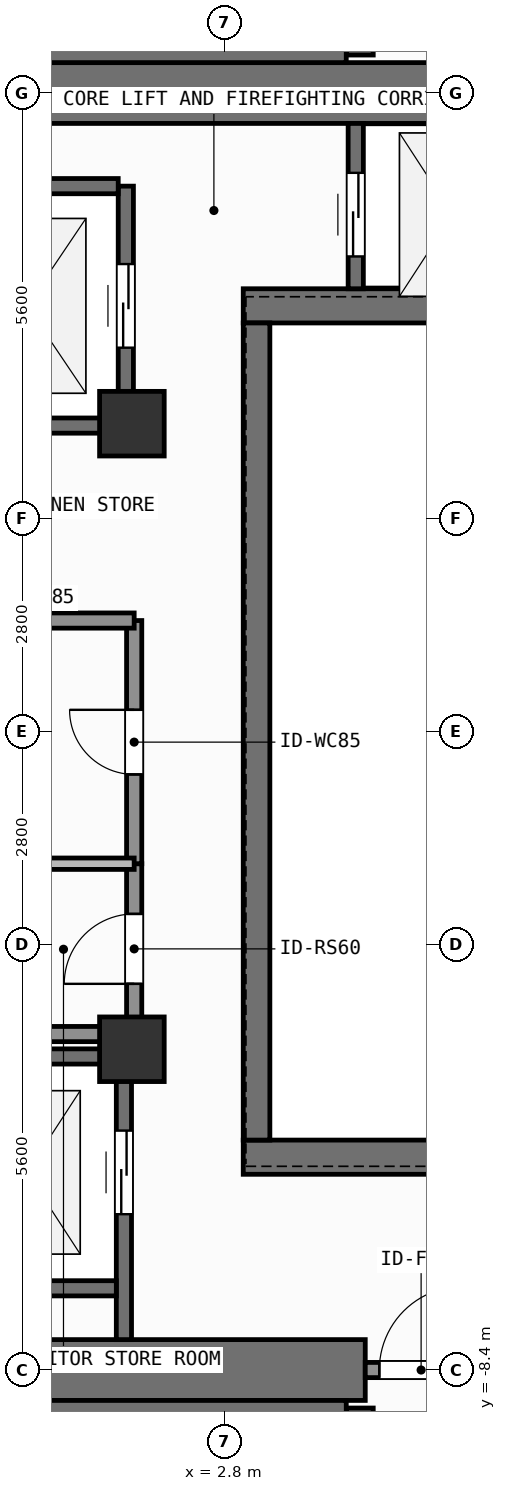
"""IFC4 building model, lengths in metres.
Left out: names, types, materials, properties, quantities, classifications, styles, units other than length and angle.
Written with IfcOpenShell. Run it as: python <this file> out.ifc"""

import sys

from ifc_helpers import new_model, si_unit, direction, frame, frame_2d, origin, origin_2d, place, context, subcontext, project, spatial, rectangle, extrude, element, fill, save


model = new_model("IFC4")
c1 = context("Model", 3, precision=1e-05, world=origin(), true_north=direction((0.0, 1.0)))
c2 = subcontext(c1, "Body", "Model", "MODEL_VIEW")
j1 = project(units=[si_unit("LENGTHUNIT", "METRE"), si_unit("PLANEANGLEUNIT", "RADIAN")], contexts=[c1])
p1 = place(None, origin())
s1 = spatial("IfcSite", under=j1, at=p1, CompositionType="ELEMENT")
p2 = place(p1, origin())
s2 = spatial("IfcBuilding", under=s1, at=p2, CompositionType="ELEMENT")
p3 = place(p2, frame((0.0, 0.0, 203.1)))
s3 = spatial("IfcBuildingStorey", under=s2, at=p3, CompositionType="ELEMENT", Elevation=203.1)
p4 = place(p3, frame((-2.62, -8.4, 0.0), z_axis=(0.0, 0.0, 1.0), x_axis=(1.0, 0.0, 0.0)))
e1 = element("IfcWall", 1, at=p4, inside=s3, PredefinedType="SHEAR", context=c2, shape_type="SweptSolid", body=[
    extrude(rectangle(XDim=7.27, YDim=0.8, at=frame_2d((3.635, 0.0))), origin(), (0.0, 0.0, 1.0), 3.9),
])
p5 = place(p3, frame((-7.55, 8.4, 0.0), z_axis=(0.0, 0.0, 1.0), x_axis=(1.0, 0.0, 0.0)))
e2 = element("IfcWall", 2, at=p5, inside=s3, PredefinedType="SHEAR", context=c2, shape_type="SweptSolid", body=[
    extrude(rectangle(XDim=16.35, YDim=0.8, at=frame_2d((8.175, 0.0))), origin(), (0.0, 0.0, 1.0), 3.9),
])
for number, where, z_axis, x_axis in (
    (3, (3.045, -5.6, 0.0), (0.0, 0.0, 1.0), (1.0, 0.0, 0.0)),
    (4, (3.045, 5.6, 0.0), (0.0, 0.0, 1.0), (1.0, 0.0, 0.0)),
):
    element("IfcWall", number, at=place(p3, frame(where, z_axis=z_axis, x_axis=x_axis)), inside=s3, PredefinedType="SHEAR", context=c2, shape_type="SweptSolid", body=[
        extrude(rectangle(XDim=5.755, YDim=0.45, at=frame_2d((2.877, 0.0))), origin(), (0.0, 0.0, 1.0), 3.9),
    ])
p6 = place(p3, frame((3.22, -5.375, 0.0), z_axis=(0.0, 0.0, 1.0), x_axis=(0.0, 1.0, 0.0)))
e5 = element("IfcWall", 5, at=p6, inside=s3, PredefinedType="SHEAR", context=c2, shape_type="SweptSolid", body=[
    extrude(rectangle(XDim=10.75, YDim=0.35, at=frame_2d((5.375, 0.0))), origin(), (0.0, 0.0, 1.0), 3.9),
])
p7 = place(p3, frame((-2.2, -8.913, 0.0), z_axis=(0.0, 0.0, 1.0), x_axis=(1.0, 0.0, 0.0)))
e6 = element("IfcWall", 6, at=p7, inside=s3, PredefinedType="SHEAR", context=c2, shape_type="SweptSolid", body=[
    extrude(rectangle(XDim=6.6, YDim=0.225, at=frame_2d((3.3, 0.0))), origin(), (0.0, 0.0, 1.0), 3.9),
])
p8 = place(p3, frame((4.58, -8.9, 0.0), z_axis=(0.0, 0.0, 1.0), x_axis=(0.0, -1.0, 0.0)))
e7 = element("IfcWall", 7, at=p8, inside=s3, PredefinedType="SHEAR", context=c2, shape_type="SweptSolid", body=[
    extrude(rectangle(XDim=2.925, YDim=0.35, at=frame_2d((1.462, 0.0))), origin(), (0.0, 0.0, 1.0), 3.9),
])
p9 = place(p8, frame((0.913, 0.0, 0.0)))
e8 = element("IfcOpeningElement", 8, at=p9, cuts=e7, PredefinedType="OPENING", context=c2, shape_type="SweptSolid", body=[
    extrude(rectangle(XDim=1.1, YDim=2.15, at=frame_2d((0.55, 1.075))), frame((0.0, 0.185, 0.0), z_axis=(0.0, -1.0, 0.0), x_axis=(1.0, 0.0, 0.0)), (0.0, 0.0, 1.0), 0.37),
])
p10 = place(p3, frame((-2.2, 8.913, 0.0), z_axis=(0.0, 0.0, 1.0), x_axis=(1.0, 0.0, 0.0)))
e9 = element("IfcWall", 9, at=p10, inside=s3, PredefinedType="SHEAR", context=c2, shape_type="SweptSolid", body=[
    extrude(rectangle(XDim=6.6, YDim=0.225, at=frame_2d((3.3, 0.0))), origin(), (0.0, 0.0, 1.0), 3.9),
])
p11 = place(p3, frame((4.58, 11.825, 0.0), z_axis=(0.0, 0.0, 1.0), x_axis=(0.0, -1.0, 0.0)))
e10 = element("IfcWall", 10, at=p11, inside=s3, PredefinedType="SHEAR", context=c2, shape_type="SweptSolid", body=[
    extrude(rectangle(XDim=2.925, YDim=0.35, at=frame_2d((1.462, 0.0))), origin(), (0.0, 0.0, 1.0), 3.9),
])
p12 = place(p11, frame((0.913, 0.0, 0.0)))
e11 = element("IfcOpeningElement", 11, at=p12, cuts=e10, PredefinedType="OPENING", context=c2, shape_type="SweptSolid", body=[
    extrude(rectangle(XDim=1.1, YDim=2.15, at=frame_2d((0.55, 1.075))), frame((0.0, 0.185, 0.0), z_axis=(0.0, -1.0, 0.0), x_axis=(1.0, 0.0, 0.0)), (0.0, 0.0, 1.0), 0.37),
])
for number, where, z_axis, x_axis in (
    (12, (1.58, -4.18, 0.0), (0.0, 0.0, 1.0), (1.0, 0.0, 0.0)),
    (13, (1.58, 4.05, 0.0), (0.0, 0.0, 1.0), (1.0, 0.0, 0.0)),
):
    element("IfcColumn", number, at=place(p3, frame(where, z_axis=z_axis, x_axis=x_axis)), inside=s3, PredefinedType="COLUMN", context=c2, shape_type="SweptSolid", body=[
        extrude(rectangle(XDim=0.85, YDim=0.85, at=origin_2d()), origin(), (0.0, 0.0, 1.0), 3.9),
    ])
p13 = place(p3, frame((1.5, 4.025, 0.0), z_axis=(0.0, 0.0, 1.0), x_axis=(0.0, 1.0, 0.0)))
e14 = element("IfcWall", 14, at=p13, inside=s3, PredefinedType="SHEAR", context=c2, shape_type="SweptSolid", body=[
    extrude(rectangle(XDim=3.15, YDim=0.2, at=frame_2d((1.575, 0.0))), origin(), (0.0, 0.0, 1.0), 3.68),
])
p14 = place(p13, frame((1.025, 0.0, 0.0)))
e15 = element("IfcOpeningElement", 15, at=p14, cuts=e14, PredefinedType="OPENING", context=c2, shape_type="SweptSolid", body=[
    extrude(rectangle(XDim=1.1, YDim=2.2, at=frame_2d((0.55, 1.1))), frame((0.0, 0.11, 0.0), z_axis=(0.0, -1.0, 0.0), x_axis=(1.0, 0.0, 0.0)), (0.0, 0.0, 1.0), 0.22),
])
for number, where, z_axis, x_axis in (
    (16, (-1.0, 4.025, 0.0), (0.0, 0.0, 1.0), (1.0, 0.0, 0.0)),
    (17, (-1.0, 7.175, 0.0), (0.0, 0.0, 1.0), (1.0, 0.0, 0.0)),
):
    element("IfcWall", number, at=place(p3, frame(where, z_axis=z_axis, x_axis=x_axis)), inside=s3, PredefinedType="SHEAR", context=c2, shape_type="SweptSolid", body=[
        extrude(rectangle(XDim=2.4, YDim=0.2, at=frame_2d((1.2, 0.0))), origin(), (0.0, 0.0, 1.0), 3.68),
    ])
p15 = place(p3, frame((1.475, -8.0, 0.0), z_axis=(0.0, 0.0, 1.0), x_axis=(0.0, 1.0, 0.0)))
e18 = element("IfcWall", 18, at=p15, inside=s3, PredefinedType="SHEAR", context=c2, shape_type="SweptSolid", body=[
    extrude(rectangle(XDim=3.725, YDim=0.2, at=frame_2d((1.863, 0.0))), origin(), (0.0, 0.0, 1.0), 3.68),
])
p16 = place(p15, frame((1.65, 0.0, 0.0)))
e19 = element("IfcOpeningElement", 19, at=p16, cuts=e18, PredefinedType="OPENING", context=c2, shape_type="SweptSolid", body=[
    extrude(rectangle(XDim=1.1, YDim=2.2, at=frame_2d((0.55, 1.1))), frame((0.0, 0.11, 0.0), z_axis=(0.0, -1.0, 0.0), x_axis=(1.0, 0.0, 0.0)), (0.0, 0.0, 1.0), 0.22),
])
for number, where, z_axis, x_axis in (
    (20, (-0.975, -7.325, 0.0), (0.0, 0.0, 1.0), (1.0, 0.0, 0.0)),
    (21, (-0.975, -4.275, 0.0), (0.0, 0.0, 1.0), (1.0, 0.0, 0.0)),
):
    element("IfcWall", number, at=place(p3, frame(where, z_axis=z_axis, x_axis=x_axis)), inside=s3, PredefinedType="SHEAR", context=c2, shape_type="SweptSolid", body=[
        extrude(rectangle(XDim=2.35, YDim=0.2, at=frame_2d((1.175, 0.0))), origin(), (0.0, 0.0, 1.0), 3.68),
    ])
p17 = place(p3, frame((4.525, 5.825, 0.0), z_axis=(0.0, 0.0, 1.0), x_axis=(0.0, 1.0, 0.0)))
e22 = element("IfcWall", 22, at=p17, inside=s3, PredefinedType="SHEAR", context=c2, shape_type="SweptSolid", body=[
    extrude(rectangle(XDim=2.175, YDim=0.2, at=frame_2d((1.087, 0.0))), origin(), (0.0, 0.0, 1.0), 3.68),
])
p18 = place(p17, frame((0.425, 0.0, 0.0)))
e23 = element("IfcOpeningElement", 23, at=p18, cuts=e22, PredefinedType="OPENING", context=c2, shape_type="SweptSolid", body=[
    extrude(rectangle(XDim=1.1, YDim=2.2, at=frame_2d((0.55, 1.1))), frame((0.0, 0.11, 0.0), z_axis=(0.0, -1.0, 0.0), x_axis=(1.0, 0.0, 0.0)), (0.0, 0.0, 1.0), 0.22),
])
p19 = place(p3, frame((4.65, -8.4, 0.0), z_axis=(0.0, 0.0, 1.0), x_axis=(1.0, 0.0, 0.0)))
e24 = element("IfcWall", 24, at=p19, inside=s3, PredefinedType="SOLIDWALL", context=c2, shape_type="SweptSolid", body=[
    extrude(rectangle(XDim=1.47, YDim=0.2, at=frame_2d((0.735, 0.0))), origin(), (0.0, 0.0, 1.0), 2.82),
])
p20 = place(p19, frame((0.185, 0.0, 0.0)))
e25 = element("IfcOpeningElement", 25, at=p20, cuts=e24, PredefinedType="OPENING", context=c2, shape_type="SweptSolid", body=[
    extrude(rectangle(XDim=1.1, YDim=2.15, at=frame_2d((0.55, 1.075))), frame((0.0, 0.11, 0.0), z_axis=(0.0, -1.0, 0.0), x_axis=(1.0, 0.0, 0.0)), (0.0, 0.0, 1.0), 0.22),
])
p21 = place(p3, frame((1.61, -3.98, 0.0), z_axis=(0.0, 0.0, 1.0), x_axis=(0.0, 1.0, 0.0)))
e26 = element("IfcWall", 26, at=p21, inside=s3, PredefinedType="SOLIDWALL", context=c2, shape_type="SweptSolid", body=[
    extrude(rectangle(XDim=2.241, YDim=0.2, at=frame_2d((1.121, 0.0))), origin(), (0.0, 0.0, 1.0), 3.68),
])
p22 = place(p21, frame((0.66, 0.0, 0.0)))
e27 = element("IfcOpeningElement", 27, at=p22, cuts=e26, PredefinedType="OPENING", context=c2, shape_type="SweptSolid", body=[
    extrude(rectangle(XDim=0.92, YDim=2.1, at=frame_2d((0.46, 1.05))), frame((0.0, 0.11, 0.0), z_axis=(0.0, -1.0, 0.0), x_axis=(1.0, 0.0, 0.0)), (0.0, 0.0, 1.0), 0.22),
])
p23 = place(p3, frame((1.61, -1.739, 0.0), z_axis=(0.0, 0.0, 1.0), x_axis=(0.0, 1.0, 0.0)))
e28 = element("IfcWall", 28, at=p23, inside=s3, PredefinedType="SOLIDWALL", context=c2, shape_type="SweptSolid", body=[
    extrude(rectangle(XDim=3.199, YDim=0.2, at=frame_2d((1.6, 0.0))), origin(), (0.0, 0.0, 1.0), 3.68),
])
p24 = place(p23, frame((1.175, 0.0, 0.0)))
e29 = element("IfcOpeningElement", 29, at=p24, cuts=e28, PredefinedType="OPENING", context=c2, shape_type="SweptSolid", body=[
    extrude(rectangle(XDim=0.85, YDim=2.1, at=frame_2d((0.425, 1.05))), frame((0.0, 0.11, 0.0), z_axis=(0.0, -1.0, 0.0), x_axis=(1.0, 0.0, 0.0)), (0.0, 0.0, 1.0), 0.22),
])
for number, where, z_axis, x_axis in (
    (30, (-1.58, -3.98, 0.0), (0.0, 0.0, 1.0), (1.0, 0.0, 0.0)),
    (31, (-1.58, 1.46, 0.0), (0.0, 0.0, 1.0), (1.0, 0.0, 0.0)),
):
    element("IfcWall", number, at=place(p3, frame(where, z_axis=z_axis, x_axis=x_axis)), inside=s3, PredefinedType="SOLIDWALL", context=c2, shape_type="SweptSolid", body=[
        extrude(rectangle(XDim=3.19, YDim=0.2, at=frame_2d((1.595, 0.0))), origin(), (0.0, 0.0, 1.0), 3.68),
    ])
p25 = place(p3, frame((-1.58, -1.739, 0.0), z_axis=(0.0, 0.0, 1.0), x_axis=(1.0, 0.0, 0.0)))
e32 = element("IfcWall", 32, at=p25, inside=s3, PredefinedType="PARTITIONING", context=c2, shape_type="SweptSolid", body=[
    extrude(rectangle(XDim=3.19, YDim=0.15, at=frame_2d((1.595, 0.0))), origin(), (0.0, 0.0, 1.0), 3.68),
])
p26 = place(p14, origin())
e33 = element("IfcDoor", 33, at=p26, inside=s3, OperationType="SLIDING_TO_LEFT", PredefinedType="DOOR", context=c2, shape_type="SweptSolid", body=[
    extrude(rectangle(XDim=1.1, YDim=2.2, at=frame_2d((0.55, 1.1))), frame((0.0, 0.025, 0.0), z_axis=(0.0, -1.0, 0.0), x_axis=(1.0, 0.0, 0.0)), (0.0, 0.0, 1.0), 0.05),
])
fill(e15, e33)
p27 = place(p16, origin())
e34 = element("IfcDoor", 34, at=p27, inside=s3, OperationType="SLIDING_TO_LEFT", PredefinedType="DOOR", context=c2, shape_type="SweptSolid", body=[
    extrude(rectangle(XDim=1.1, YDim=2.2, at=frame_2d((0.55, 1.1))), frame((0.0, 0.025, 0.0), z_axis=(0.0, -1.0, 0.0), x_axis=(1.0, 0.0, 0.0)), (0.0, 0.0, 1.0), 0.05),
])
fill(e19, e34)
p28 = place(p18, origin())
e35 = element("IfcDoor", 35, at=p28, inside=s3, OperationType="SLIDING_TO_LEFT", PredefinedType="DOOR", context=c2, shape_type="SweptSolid", body=[
    extrude(rectangle(XDim=1.1, YDim=2.2, at=frame_2d((0.55, 1.1))), frame((0.0, 0.025, 0.0), z_axis=(0.0, -1.0, 0.0), x_axis=(1.0, 0.0, 0.0)), (0.0, 0.0, 1.0), 0.05),
])
fill(e23, e35)
p29 = place(p20, origin())
e36 = element("IfcDoor", 36, at=p29, inside=s3, OperationType="SINGLE_SWING_RIGHT", PredefinedType="DOOR", context=c2, shape_type="SweptSolid", body=[
    extrude(rectangle(XDim=1.1, YDim=2.15, at=frame_2d((0.55, 1.075))), frame((0.0, 0.025, 0.0), z_axis=(0.0, -1.0, 0.0), x_axis=(1.0, 0.0, 0.0)), (0.0, 0.0, 1.0), 0.05),
])
fill(e25, e36)
p30 = place(p22, origin())
e37 = element("IfcDoor", 37, at=p30, inside=s3, OperationType="SINGLE_SWING_LEFT", PredefinedType="DOOR", context=c2, shape_type="SweptSolid", body=[
    extrude(rectangle(XDim=0.92, YDim=2.1, at=frame_2d((0.46, 1.05))), frame((0.0, 0.025, 0.0), z_axis=(0.0, -1.0, 0.0), x_axis=(1.0, 0.0, 0.0)), (0.0, 0.0, 1.0), 0.05),
])
fill(e27, e37)
p31 = place(p24, origin())
e38 = element("IfcDoor", 38, at=p31, inside=s3, OperationType="SINGLE_SWING_RIGHT", PredefinedType="DOOR", context=c2, shape_type="SweptSolid", body=[
    extrude(rectangle(XDim=0.85, YDim=2.1, at=frame_2d((0.425, 1.05))), frame((0.0, 0.025, 0.0), z_axis=(0.0, -1.0, 0.0), x_axis=(1.0, 0.0, 0.0)), (0.0, 0.0, 1.0), 0.05),
])
fill(e29, e38)
save(model, sys.argv[1])
